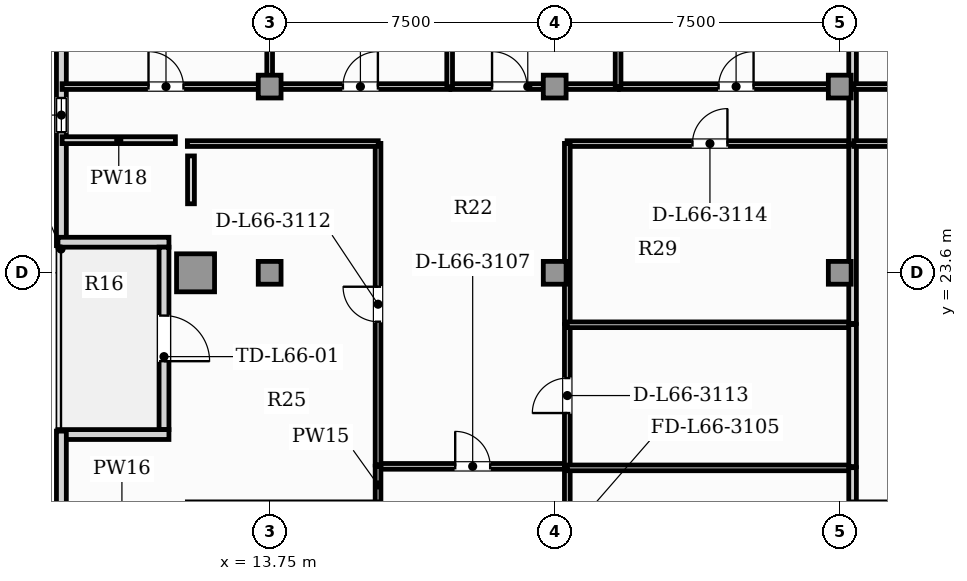
"""IFC4 building model, lengths in metres.
Left out: names, types, materials, properties, quantities, classifications, styles, units other than length and angle.
Written with IfcOpenShell. Run it as: python <this file> out.ifc"""

import sys

from ifc_helpers import new_model, si_unit, direction, frame, frame_2d, origin, origin_2d, place, context, subcontext, project, spatial, rectangle, hollow_rectangle, extrude, element, fill, save


model = new_model("IFC4")
c1 = context("Model", 3, precision=1e-05, world=origin(), true_north=direction((0.0, 1.0)))
c2 = subcontext(c1, "Body", "Model", "MODEL_VIEW")
j1 = project(units=[si_unit("LENGTHUNIT", "METRE"), si_unit("PLANEANGLEUNIT", "RADIAN")], contexts=[c1])
p1 = place(None, origin())
s1 = spatial("IfcSite", under=j1, at=p1, CompositionType="ELEMENT")
p2 = place(p1, origin())
s2 = spatial("IfcBuilding", under=s1, at=p2, CompositionType="ELEMENT")
p3 = place(p2, frame((0.0, 0.0, 268.3)))
s3 = spatial("IfcBuildingStorey", under=s2, at=p3, CompositionType="ELEMENT", Elevation=268.3)
p4 = place(p3, frame((11.8, 23.6, 0.0), z_axis=(0.0, 0.0, 1.0), x_axis=(1.0, 0.0, 0.0)))
e1 = element("IfcColumn", 1, at=p4, inside=s3, PredefinedType="USERDEFINED", context=c2, shape_type="SweptSolid", body=[
    extrude(hollow_rectangle(XDim=1.0, YDim=1.0, WallThickness=0.06, at=origin_2d()), origin(), (0.0, 0.0, 1.0), 3.85),
])
for number, where, z_axis, x_axis in (
    (2, (13.75, 23.6, 0.0), (0.0, 0.0, 1.0), (1.0, 0.0, 0.0)),
    (3, (21.25, 23.6, 0.0), (0.0, 0.0, 1.0), (1.0, 0.0, 0.0)),
    (4, (28.75, 23.6, 0.0), (0.0, 0.0, 1.0), (1.0, 0.0, 0.0)),
    (5, (13.75, 28.5, 0.0), (0.0, 0.0, 1.0), (1.0, 0.0, 0.0)),
    (6, (21.25, 28.5, 0.0), (0.0, 0.0, 1.0), (1.0, 0.0, 0.0)),
    (7, (28.75, 28.5, 0.0), (0.0, 0.0, 1.0), (1.0, 0.0, 0.0)),
):
    element("IfcColumn", number, at=place(p3, frame(where, z_axis=z_axis, x_axis=x_axis)), inside=s3, PredefinedType="COLUMN", context=c2, shape_type="SweptSolid", body=[
        extrude(rectangle(XDim=0.6, YDim=0.6, at=origin_2d()), origin(), (0.0, 0.0, 1.0), 3.85),
    ])
p5 = place(p3, frame((8.27, 32.109, 0.0), z_axis=(0.0, 0.0, 1.0), x_axis=(0.0, -1.0, 0.0)))
e8 = element("IfcWall", 8, at=p5, inside=s3, PredefinedType="SOLIDWALL", context=c2, shape_type="SweptSolid", body=[
    extrude(rectangle(XDim=7.795, YDim=0.26, at=frame_2d((3.897, 0.0))), origin(), (0.0, 0.0, 1.0), 3.65),
])
p6 = place(p5, frame((3.909, 0.0, 0.95)))
e9 = element("IfcOpeningElement", 9, at=p6, cuts=e8, PredefinedType="OPENING", context=c2, shape_type="SweptSolid", body=[
    extrude(rectangle(XDim=0.9, YDim=1.5, at=frame_2d((0.45, 0.75))), frame((0.0, 0.14, 0.0), z_axis=(0.0, -1.0, 0.0), x_axis=(1.0, 0.0, 0.0)), (0.0, 0.0, 1.0), 0.28),
])
p7 = place(p3, frame((8.18, 24.405, 0.0), z_axis=(0.0, 0.0, 1.0), x_axis=(1.0, 0.0, 0.0)))
e10 = element("IfcWall", 10, at=p7, inside=s3, PredefinedType="SOLIDWALL", context=c2, shape_type="SweptSolid", body=[
    extrude(rectangle(XDim=2.92, YDim=0.26, at=frame_2d((1.46, 0.0))), origin(), (0.0, 0.0, 1.0), 3.65),
])
p8 = place(p3, frame((10.97, 24.275, 0.0), z_axis=(0.0, 0.0, 1.0), x_axis=(0.0, -1.0, 0.0)))
e11 = element("IfcWall", 11, at=p8, inside=s3, PredefinedType="SOLIDWALL", context=c2, shape_type="SweptSolid", body=[
    extrude(rectangle(XDim=4.8, YDim=0.26, at=frame_2d((2.4, 0.0))), origin(), (0.0, 0.0, 1.0), 3.19),
])
p9 = place(p8, frame((1.8, 0.0, 0.0)))
e12 = element("IfcOpeningElement", 12, at=p9, cuts=e11, PredefinedType="OPENING", context=c2, shape_type="SweptSolid", body=[
    extrude(rectangle(XDim=1.2, YDim=2.2, at=frame_2d((0.6, 1.1))), frame((0.0, 0.14, 0.0), z_axis=(0.0, -1.0, 0.0), x_axis=(1.0, 0.0, 0.0)), (0.0, 0.0, 1.0), 0.28),
])
p10 = place(p3, frame((11.1, 19.345, 0.0), z_axis=(0.0, 0.0, 1.0), x_axis=(-1.0, 0.0, 0.0)))
e13 = element("IfcWall", 13, at=p10, inside=s3, PredefinedType="SOLIDWALL", context=c2, shape_type="SweptSolid", body=[
    extrude(rectangle(XDim=2.92, YDim=0.26, at=frame_2d((1.46, 0.0))), origin(), (0.0, 0.0, 1.0), 3.65),
])
p11 = place(p3, frame((8.27, 19.435, 0.0), z_axis=(0.0, 0.0, 1.0), x_axis=(0.0, -1.0, 0.0)))
e14 = element("IfcWall", 14, at=p11, inside=s3, PredefinedType="SOLIDWALL", context=c2, shape_type="SweptSolid", body=[
    extrude(rectangle(XDim=16.195, YDim=0.26, at=frame_2d((8.097, 0.0))), origin(), (0.0, 0.0, 1.0), 3.65),
])
p12 = place(p11, frame((13.025, 0.0, 0.85)))
e15 = element("IfcOpeningElement", 15, at=p12, cuts=e14, PredefinedType="OPENING", context=c2, shape_type="SweptSolid", body=[
    extrude(rectangle(XDim=2.4, YDim=2.0, at=frame_2d((1.2, 1.0))), frame((0.0, 0.14, 0.0), z_axis=(0.0, -1.0, 0.0), x_axis=(1.0, 0.0, 0.0)), (0.0, 0.0, 1.0), 0.28),
])
p13 = place(p3, frame((16.597, 18.507, 0.0), z_axis=(0.0, 0.0, 1.0), x_axis=(1.0, 0.0, 0.0)))
e16 = element("IfcWall", 16, at=p13, inside=s3, PredefinedType="PARTITIONING", context=c2, shape_type="SweptSolid", body=[
    extrude(rectangle(XDim=4.99, YDim=0.15, at=frame_2d((2.495, 0.0))), origin(), (0.0, 0.0, 1.0), 3.65),
])
p14 = place(p13, frame((2.035, 0.0, 0.0)))
e17 = element("IfcOpeningElement", 17, at=p14, cuts=e16, PredefinedType="OPENING", context=c2, shape_type="SweptSolid", body=[
    extrude(rectangle(XDim=0.92, YDim=2.1, at=frame_2d((0.46, 1.05))), frame((0.0, 0.085, 0.0), z_axis=(0.0, -1.0, 0.0), x_axis=(1.0, 0.0, 0.0)), (0.0, 0.0, 1.0), 0.17),
])
p15 = place(p3, frame((16.602, 17.525, 0.0), z_axis=(0.0, 0.0, 1.0), x_axis=(0.0, 1.0, 0.0)))
e18 = element("IfcWall", 18, at=p15, inside=s3, PredefinedType="PARTITIONING", context=c2, shape_type="SweptSolid", body=[
    extrude(rectangle(XDim=0.987, YDim=0.15, at=frame_2d((0.494, 0.0))), origin(), (0.0, 0.0, 1.0), 3.65),
])
p16 = place(p3, frame((21.582, 15.695, 0.0), z_axis=(0.0, 0.0, 1.0), x_axis=(0.0, 1.0, 0.0)))
e19 = element("IfcWall", 19, at=p16, inside=s3, PredefinedType="PARTITIONING", context=c2, shape_type="SweptSolid", body=[
    extrude(rectangle(XDim=2.777, YDim=0.15, at=frame_2d((1.389, 0.0))), origin(), (0.0, 0.0, 1.0), 3.65),
])
p17 = place(p16, frame((0.929, 0.0, 0.0)))
e20 = element("IfcOpeningElement", 20, at=p17, cuts=e19, PredefinedType="OPENING", context=c2, shape_type="SweptSolid", body=[
    extrude(rectangle(XDim=0.92, YDim=2.1, at=frame_2d((0.46, 1.05))), frame((0.0, 0.085, 0.0), z_axis=(0.0, -1.0, 0.0), x_axis=(1.0, 0.0, 0.0)), (0.0, 0.0, 1.0), 0.17),
])
p18 = place(p3, frame((16.602, 18.542, 0.0), z_axis=(0.0, 0.0, 1.0), x_axis=(0.0, 1.0, 0.0)))
e21 = element("IfcWall", 21, at=p18, inside=s3, PredefinedType="PARTITIONING", context=c2, shape_type="SweptSolid", body=[
    extrude(rectangle(XDim=8.463, YDim=0.15, at=frame_2d((4.231, 0.0))), origin(), (0.0, 0.0, 1.0), 3.65),
])
p19 = place(p18, frame((3.771, 0.0, 0.0)))
e22 = element("IfcOpeningElement", 22, at=p19, cuts=e21, PredefinedType="OPENING", context=c2, shape_type="SweptSolid", body=[
    extrude(rectangle(XDim=0.92, YDim=2.1, at=frame_2d((0.46, 1.05))), frame((0.0, 0.085, 0.0), z_axis=(0.0, -1.0, 0.0), x_axis=(1.0, 0.0, 0.0)), (0.0, 0.0, 1.0), 0.17),
])
p20 = place(p3, frame((11.585, 27.0, 0.0), z_axis=(0.0, 0.0, 1.0), x_axis=(1.0, 0.0, 0.0)))
e23 = element("IfcWall", 23, at=p20, inside=s3, PredefinedType="PARTITIONING", context=c2, shape_type="SweptSolid", body=[
    extrude(rectangle(XDim=5.022, YDim=0.15, at=frame_2d((2.511, 0.0))), origin(), (0.0, 0.0, 1.0), 3.65),
])
p21 = place(p3, frame((21.582, 18.502, 0.0), z_axis=(0.0, 0.0, 1.0), x_axis=(0.0, 1.0, 0.0)))
e24 = element("IfcWall", 24, at=p21, inside=s3, PredefinedType="PARTITIONING", context=c2, shape_type="SweptSolid", body=[
    extrude(rectangle(XDim=3.736, YDim=0.15, at=frame_2d((1.868, 0.0))), origin(), (0.0, 0.0, 1.0), 3.65),
])
p22 = place(p21, frame((1.408, 0.0, 0.0)))
e25 = element("IfcOpeningElement", 25, at=p22, cuts=e24, PredefinedType="OPENING", context=c2, shape_type="SweptSolid", body=[
    extrude(rectangle(XDim=0.92, YDim=2.1, at=frame_2d((0.46, 1.05))), frame((0.0, 0.085, 0.0), z_axis=(0.0, -1.0, 0.0), x_axis=(1.0, 0.0, 0.0)), (0.0, 0.0, 1.0), 0.17),
])
p23 = place(p3, frame((21.577, 27.0, 0.0), z_axis=(0.0, 0.0, 1.0), x_axis=(1.0, 0.0, 0.0)))
e26 = element("IfcWall", 26, at=p23, inside=s3, PredefinedType="PARTITIONING", context=c2, shape_type="SweptSolid", body=[
    extrude(rectangle(XDim=7.516, YDim=0.15, at=frame_2d((3.758, 0.0))), origin(), (0.0, 0.0, 1.0), 3.65),
])
p24 = place(p23, frame((3.298, 0.0, 0.0)))
e27 = element("IfcOpeningElement", 27, at=p24, cuts=e26, PredefinedType="OPENING", context=c2, shape_type="SweptSolid", body=[
    extrude(rectangle(XDim=0.92, YDim=2.1, at=frame_2d((0.46, 1.05))), frame((0.0, 0.085, 0.0), z_axis=(0.0, -1.0, 0.0), x_axis=(1.0, 0.0, 0.0)), (0.0, 0.0, 1.0), 0.17),
])
p25 = place(p3, frame((21.582, 22.268, 0.0), z_axis=(0.0, 0.0, 1.0), x_axis=(0.0, 1.0, 0.0)))
e28 = element("IfcWall", 28, at=p25, inside=s3, PredefinedType="PARTITIONING", context=c2, shape_type="SweptSolid", body=[
    extrude(rectangle(XDim=4.737, YDim=0.15, at=frame_2d((2.368, 0.0))), origin(), (0.0, 0.0, 1.0), 3.65),
])
p26 = place(p3, frame((8.289, 28.5, 0.0), z_axis=(0.0, 0.0, 1.0), x_axis=(1.0, 0.0, 0.0)))
e29 = element("IfcWall", 29, at=p26, inside=s3, PredefinedType="PARTITIONING", context=c2, shape_type="SweptSolid", body=[
    extrude(rectangle(XDim=5.466, YDim=0.15, at=frame_2d((2.733, 0.0))), origin(), (0.0, 0.0, 1.0), 3.65),
])
p27 = place(p26, frame((2.273, 0.0, 0.0)))
e30 = element("IfcOpeningElement", 30, at=p27, cuts=e29, PredefinedType="OPENING", context=c2, shape_type="SweptSolid", body=[
    extrude(rectangle(XDim=0.92, YDim=2.1, at=frame_2d((0.46, 1.05))), frame((0.0, 0.085, 0.0), z_axis=(0.0, -1.0, 0.0), x_axis=(1.0, 0.0, 0.0)), (0.0, 0.0, 1.0), 0.17),
])
p28 = place(p3, frame((13.785, 28.5, 0.0), z_axis=(0.0, 0.0, 1.0), x_axis=(1.0, 0.0, 0.0)))
e31 = element("IfcWall", 31, at=p28, inside=s3, PredefinedType="PARTITIONING", context=c2, shape_type="SweptSolid", body=[
    extrude(rectangle(XDim=4.706, YDim=0.15, at=frame_2d((2.353, 0.0))), origin(), (0.0, 0.0, 1.0), 3.105),
])
p29 = place(p28, frame((1.893, 0.0, 0.0)))
e32 = element("IfcOpeningElement", 32, at=p29, cuts=e31, PredefinedType="OPENING", context=c2, shape_type="SweptSolid", body=[
    extrude(rectangle(XDim=0.92, YDim=2.1, at=frame_2d((0.46, 1.05))), frame((0.0, 0.085, 0.0), z_axis=(0.0, -1.0, 0.0), x_axis=(1.0, 0.0, 0.0)), (0.0, 0.0, 1.0), 0.17),
])
p30 = place(p3, frame((18.521, 28.5, 0.0), z_axis=(0.0, 0.0, 1.0), x_axis=(1.0, 0.0, 0.0)))
e33 = element("IfcWall", 33, at=p30, inside=s3, PredefinedType="PARTITIONING", context=c2, shape_type="SweptSolid", body=[
    extrude(rectangle(XDim=4.402, YDim=0.15, at=frame_2d((2.201, 0.0))), origin(), (0.0, 0.0, 1.0), 3.105),
])
p31 = place(p30, frame((1.081, 0.0, 0.0)))
e34 = element("IfcOpeningElement", 34, at=p31, cuts=e33, PredefinedType="OPENING", context=c2, shape_type="SweptSolid", body=[
    extrude(rectangle(XDim=0.92, YDim=2.1, at=frame_2d((0.46, 1.05))), frame((0.0, 0.085, 0.0), z_axis=(0.0, -1.0, 0.0), x_axis=(1.0, 0.0, 0.0)), (0.0, 0.0, 1.0), 0.17),
])
p32 = place(p3, frame((22.953, 28.5, 0.0), z_axis=(0.0, 0.0, 1.0), x_axis=(1.0, 0.0, 0.0)))
e35 = element("IfcWall", 35, at=p32, inside=s3, PredefinedType="PARTITIONING", context=c2, shape_type="SweptSolid", body=[
    extrude(rectangle(XDim=6.14, YDim=0.15, at=frame_2d((3.07, 0.0))), origin(), (0.0, 0.0, 1.0), 3.105),
])
p33 = place(p32, frame((2.61, 0.0, 0.0)))
e36 = element("IfcOpeningElement", 36, at=p33, cuts=e35, PredefinedType="OPENING", context=c2, shape_type="SweptSolid", body=[
    extrude(rectangle(XDim=0.92, YDim=2.1, at=frame_2d((0.46, 1.05))), frame((0.0, 0.085, 0.0), z_axis=(0.0, -1.0, 0.0), x_axis=(1.0, 0.0, 0.0)), (0.0, 0.0, 1.0), 0.17),
])
p34 = place(p3, frame((29.088, 26.995, 0.0), z_axis=(0.0, 0.0, 1.0), x_axis=(0.0, 1.0, 0.0)))
e37 = element("IfcWall", 37, at=p34, inside=s3, PredefinedType="PARTITIONING", context=c2, shape_type="SweptSolid", body=[
    extrude(rectangle(XDim=1.51, YDim=0.2, at=frame_2d((0.755, 0.0))), origin(), (0.0, 0.0, 1.0), 3.65),
])
p35 = place(p3, frame((21.577, 18.468, 0.0), z_axis=(0.0, 0.0, 1.0), x_axis=(1.0, 0.0, 0.0)))
e38 = element("IfcWall", 38, at=p35, inside=s3, PredefinedType="PARTITIONING", context=c2, shape_type="SweptSolid", body=[
    extrude(rectangle(XDim=7.516, YDim=0.15, at=frame_2d((3.758, 0.0))), origin(), (0.0, 0.0, 1.0), 3.65),
])
p36 = place(p3, frame((29.088, 17.525, 0.0), z_axis=(0.0, 0.0, 1.0), x_axis=(0.0, 1.0, 0.0)))
e39 = element("IfcWall", 39, at=p36, inside=s3, PredefinedType="PARTITIONING", context=c2, shape_type="SweptSolid", body=[
    extrude(rectangle(XDim=0.948, YDim=0.2, at=frame_2d((0.474, 0.0))), origin(), (0.0, 0.0, 1.0), 3.65),
])
p37 = place(p3, frame((21.577, 22.233, 0.0), z_axis=(0.0, 0.0, 1.0), x_axis=(1.0, 0.0, 0.0)))
e40 = element("IfcWall", 40, at=p37, inside=s3, PredefinedType="PARTITIONING", context=c2, shape_type="SweptSolid", body=[
    extrude(rectangle(XDim=7.516, YDim=0.15, at=frame_2d((3.758, 0.0))), origin(), (0.0, 0.0, 1.0), 3.65),
])
p38 = place(p3, frame((29.088, 18.502, 0.0), z_axis=(0.0, 0.0, 1.0), x_axis=(0.0, 1.0, 0.0)))
e41 = element("IfcWall", 41, at=p38, inside=s3, PredefinedType="PARTITIONING", context=c2, shape_type="SweptSolid", body=[
    extrude(rectangle(XDim=3.736, YDim=0.2, at=frame_2d((1.868, 0.0))), origin(), (0.0, 0.0, 1.0), 3.65),
])
p39 = place(p3, frame((29.088, 22.268, 0.0), z_axis=(0.0, 0.0, 1.0), x_axis=(0.0, 1.0, 0.0)))
e42 = element("IfcWall", 42, at=p39, inside=s3, PredefinedType="PARTITIONING", context=c2, shape_type="SweptSolid", body=[
    extrude(rectangle(XDim=4.697, YDim=0.2, at=frame_2d((2.349, 0.0))), origin(), (0.0, 0.0, 1.0), 3.65),
])
for number, where, z_axis, x_axis in (
    (43, (13.75, 28.495, 0.0), (0.0, 0.0, 1.0), (0.0, 1.0, 0.0)),
    (44, (18.486, 28.495, 0.0), (0.0, 0.0, 1.0), (0.0, 1.0, 0.0)),
    (45, (22.918, 28.495, 0.0), (0.0, 0.0, 1.0), (0.0, 1.0, 0.0)),
):
    element("IfcWall", number, at=place(p3, frame(where, z_axis=z_axis, x_axis=x_axis)), inside=s3, PredefinedType="PARTITIONING", context=c2, shape_type="SweptSolid", body=[
        extrude(rectangle(XDim=6.705, YDim=0.15, at=frame_2d((3.353, 0.0))), origin(), (0.0, 0.0, 1.0), 3.65),
    ])
p40 = place(p3, frame((29.088, 28.535, 0.0), z_axis=(0.0, 0.0, 1.0), x_axis=(0.0, 1.0, 0.0)))
e46 = element("IfcWall", 46, at=p40, inside=s3, PredefinedType="PARTITIONING", context=c2, shape_type="SweptSolid", body=[
    extrude(rectangle(XDim=6.665, YDim=0.2, at=frame_2d((3.333, 0.0))), origin(), (0.0, 0.0, 1.0), 3.65),
])
p41 = place(p3, frame((29.123, 27.0, 0.0), z_axis=(0.0, 0.0, 1.0), x_axis=(1.0, 0.0, 0.0)))
e47 = element("IfcWall", 47, at=p41, inside=s3, PredefinedType="PARTITIONING", context=c2, shape_type="SweptSolid", body=[
    extrude(rectangle(XDim=7.221, YDim=0.15, at=frame_2d((3.611, 0.0))), origin(), (0.0, 0.0, 1.0), 3.65),
])
p42 = place(p3, frame((29.123, 28.5, 0.0), z_axis=(0.0, 0.0, 1.0), x_axis=(1.0, 0.0, 0.0)))
e48 = element("IfcWall", 48, at=p42, inside=s3, PredefinedType="PARTITIONING", context=c2, shape_type="SweptSolid", body=[
    extrude(rectangle(XDim=5.72, YDim=0.15, at=frame_2d((2.86, 0.0))), origin(), (0.0, 0.0, 1.0), 3.105),
])
p43 = place(p42, frame((2.4, 0.0, 0.0)))
e49 = element("IfcOpeningElement", 49, at=p43, cuts=e48, PredefinedType="OPENING", context=c2, shape_type="SweptSolid", body=[
    extrude(rectangle(XDim=0.92, YDim=2.1, at=frame_2d((0.46, 1.05))), frame((0.0, 0.085, 0.0), z_axis=(0.0, -1.0, 0.0), x_axis=(1.0, 0.0, 0.0)), (0.0, 0.0, 1.0), 0.17),
])
p44 = place(p3, frame((11.27, 27.09, 0.0), z_axis=(0.0, 0.0, 1.0), x_axis=(-1.0, 0.0, 0.0)))
e50 = element("IfcWall", 50, at=p44, inside=s3, PredefinedType="PARTITIONING", context=c2, shape_type="SweptSolid", body=[
    extrude(rectangle(XDim=2.981, YDim=0.18, at=frame_2d((1.49, 0.0))), origin(), (0.0, 0.0, 1.0), 3.65),
])
p45 = place(p3, frame((11.68, 25.417, 0.0), z_axis=(0.0, 0.0, 1.0), x_axis=(0.0, 1.0, 0.0)))
e51 = element("IfcWall", 51, at=p45, inside=s3, PredefinedType="PARTITIONING", context=c2, shape_type="SweptSolid", body=[
    extrude(rectangle(XDim=1.259, YDim=0.18, at=frame_2d((0.629, 0.0))), origin(), (0.0, 0.0, 1.0), 3.65),
])
p46 = place(p9, frame((1.2, 0.0, 0.0), z_axis=(0.0, 0.0, 1.0), x_axis=(-1.0, 0.0, 0.0)))
e52 = element("IfcDoor", 52, at=p46, inside=s3, OperationType="SINGLE_SWING_LEFT", PredefinedType="DOOR", context=c2, shape_type="SweptSolid", body=[
    extrude(rectangle(XDim=1.2, YDim=2.2, at=frame_2d((0.6, 1.1))), frame((0.0, 0.025, 0.0), z_axis=(0.0, -1.0, 0.0), x_axis=(1.0, 0.0, 0.0)), (0.0, 0.0, 1.0), 0.05),
])
fill(e12, e52)
p47 = place(p6, origin())
e53 = element("IfcWindow", 53, at=p47, inside=s3, PartitioningType="SINGLE_PANEL", PredefinedType="WINDOW", context=c2, shape_type="SweptSolid", body=[
    extrude(rectangle(XDim=0.9, YDim=1.5, at=frame_2d((0.45, 0.75))), frame((0.0, 0.03, 0.0), z_axis=(0.0, -1.0, 0.0), x_axis=(1.0, 0.0, 0.0)), (0.0, 0.0, 1.0), 0.06),
])
fill(e9, e53)
p48 = place(p14, origin())
e54 = element("IfcDoor", 54, at=p48, inside=s3, OperationType="SINGLE_SWING_LEFT", PredefinedType="DOOR", context=c2, shape_type="SweptSolid", body=[
    extrude(rectangle(XDim=0.92, YDim=2.1, at=frame_2d((0.46, 1.05))), frame((0.0, 0.025, 0.0), z_axis=(0.0, -1.0, 0.0), x_axis=(1.0, 0.0, 0.0)), (0.0, 0.0, 1.0), 0.05),
])
fill(e17, e54)
p49 = place(p19, origin())
e55 = element("IfcDoor", 55, at=p49, inside=s3, OperationType="SINGLE_SWING_RIGHT", PredefinedType="DOOR", context=c2, shape_type="SweptSolid", body=[
    extrude(rectangle(XDim=0.92, YDim=2.1, at=frame_2d((0.46, 1.05))), frame((0.0, 0.025, 0.0), z_axis=(0.0, -1.0, 0.0), x_axis=(1.0, 0.0, 0.0)), (0.0, 0.0, 1.0), 0.05),
])
fill(e22, e55)
p50 = place(p22, origin())
e56 = element("IfcDoor", 56, at=p50, inside=s3, OperationType="SINGLE_SWING_LEFT", PredefinedType="DOOR", context=c2, shape_type="SweptSolid", body=[
    extrude(rectangle(XDim=0.92, YDim=2.1, at=frame_2d((0.46, 1.05))), frame((0.0, 0.025, 0.0), z_axis=(0.0, -1.0, 0.0), x_axis=(1.0, 0.0, 0.0)), (0.0, 0.0, 1.0), 0.05),
])
fill(e25, e56)
p51 = place(p24, origin())
e57 = element("IfcDoor", 57, at=p51, inside=s3, OperationType="SINGLE_SWING_RIGHT", PredefinedType="DOOR", context=c2, shape_type="SweptSolid", body=[
    extrude(rectangle(XDim=0.92, YDim=2.1, at=frame_2d((0.46, 1.05))), frame((0.0, 0.025, 0.0), z_axis=(0.0, -1.0, 0.0), x_axis=(1.0, 0.0, 0.0)), (0.0, 0.0, 1.0), 0.05),
])
fill(e27, e57)
p52 = place(p27, origin())
e58 = element("IfcDoor", 58, at=p52, inside=s3, OperationType="SINGLE_SWING_LEFT", PredefinedType="DOOR", context=c2, shape_type="SweptSolid", body=[
    extrude(rectangle(XDim=0.92, YDim=2.1, at=frame_2d((0.46, 1.05))), frame((0.0, 0.025, 0.0), z_axis=(0.0, -1.0, 0.0), x_axis=(1.0, 0.0, 0.0)), (0.0, 0.0, 1.0), 0.05),
])
fill(e30, e58)
p53 = place(p29, origin())
e59 = element("IfcDoor", 59, at=p53, inside=s3, OperationType="SINGLE_SWING_RIGHT", PredefinedType="DOOR", context=c2, shape_type="SweptSolid", body=[
    extrude(rectangle(XDim=0.92, YDim=2.1, at=frame_2d((0.46, 1.05))), frame((0.0, 0.025, 0.0), z_axis=(0.0, -1.0, 0.0), x_axis=(1.0, 0.0, 0.0)), (0.0, 0.0, 1.0), 0.05),
])
fill(e32, e59)
p54 = place(p31, origin())
e60 = element("IfcDoor", 60, at=p54, inside=s3, OperationType="SINGLE_SWING_LEFT", PredefinedType="DOOR", context=c2, shape_type="SweptSolid", body=[
    extrude(rectangle(XDim=0.92, YDim=2.1, at=frame_2d((0.46, 1.05))), frame((0.0, 0.025, 0.0), z_axis=(0.0, -1.0, 0.0), x_axis=(1.0, 0.0, 0.0)), (0.0, 0.0, 1.0), 0.05),
])
fill(e34, e60)
p55 = place(p33, origin())
e61 = element("IfcDoor", 61, at=p55, inside=s3, OperationType="SINGLE_SWING_RIGHT", PredefinedType="DOOR", context=c2, shape_type="SweptSolid", body=[
    extrude(rectangle(XDim=0.92, YDim=2.1, at=frame_2d((0.46, 1.05))), frame((0.0, 0.025, 0.0), z_axis=(0.0, -1.0, 0.0), x_axis=(1.0, 0.0, 0.0)), (0.0, 0.0, 1.0), 0.05),
])
fill(e36, e61)
save(model, sys.argv[1])
